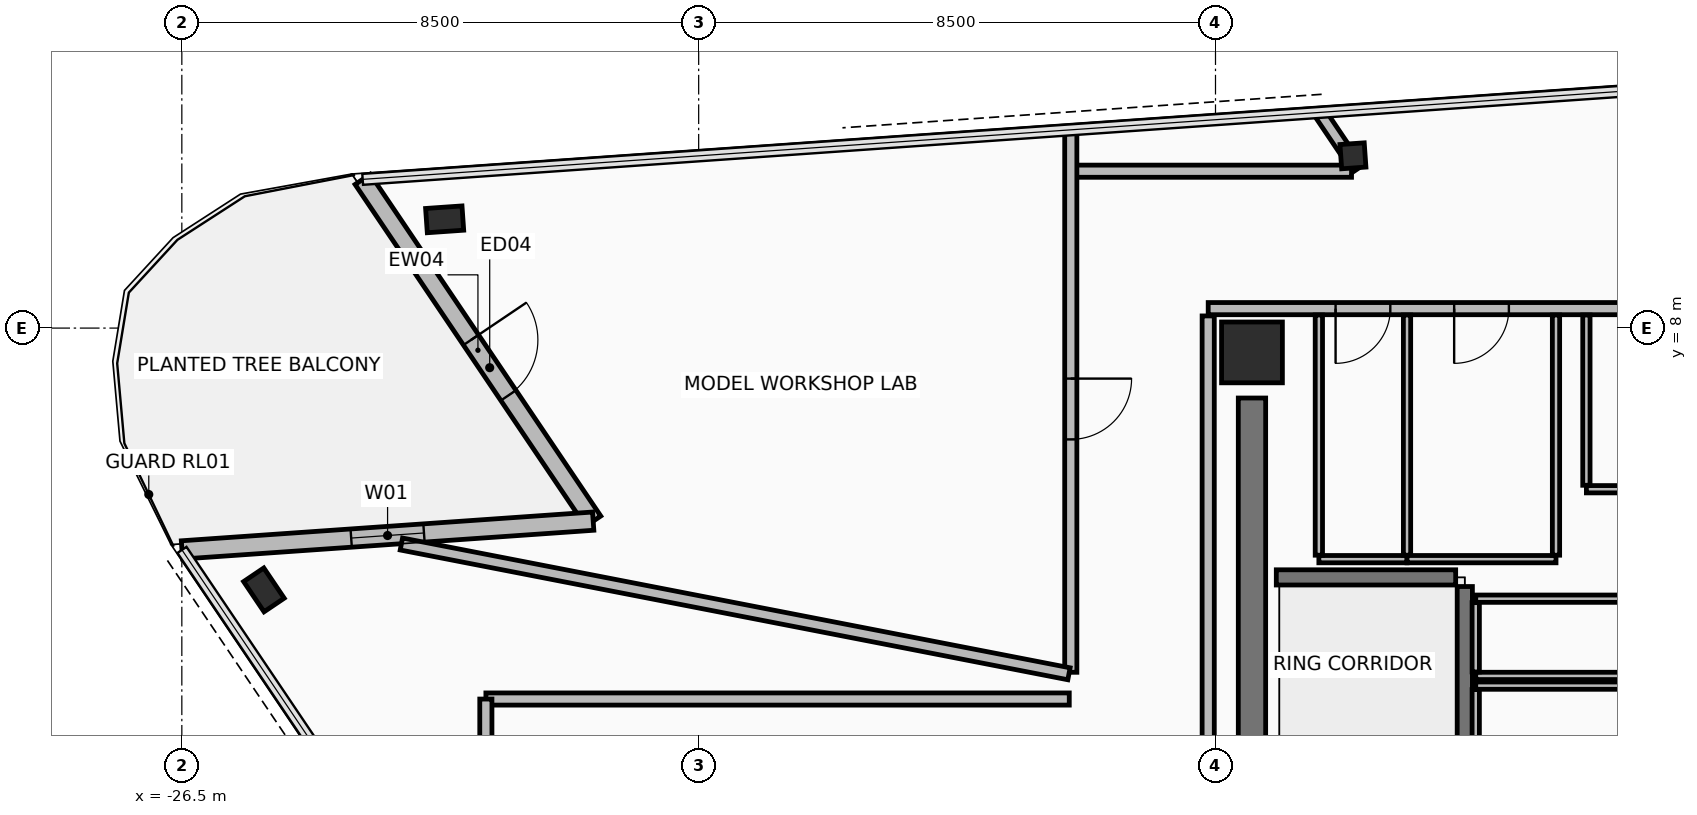
"""IFC4 building model, lengths in metres.
Left out: names, types, materials, properties, quantities, classifications, styles, units other than length and angle.
Written with IfcOpenShell. Run it as: python <this file> out.ifc"""

import sys

from ifc_helpers import new_model, si_unit, direction, frame, frame_2d, origin, origin_2d, place, context, subcontext, project, spatial, rectangle, hollow_rectangle, extrude, element, fill, save


model = new_model("IFC4")
c1 = context("Model", 3, precision=1e-05, world=origin(), true_north=direction((0.0, 1.0)))
c2 = subcontext(c1, "Body", "Model", "MODEL_VIEW")
j1 = project(units=[si_unit("LENGTHUNIT", "METRE"), si_unit("PLANEANGLEUNIT", "RADIAN")], contexts=[c1])
p1 = place(None, origin())
s1 = spatial("IfcSite", under=j1, at=p1, CompositionType="ELEMENT")
p2 = place(p1, origin())
s2 = spatial("IfcBuilding", under=s1, at=p2, CompositionType="ELEMENT")
p3 = place(p2, frame((0.0, 0.0, 264.2)))
s3 = spatial("IfcBuildingStorey", under=s2, at=p3, CompositionType="ELEMENT", Elevation=264.2)
p4 = place(p3, frame((-8.9, 7.6, 0.0), z_axis=(0.0, 0.0, 1.0), x_axis=(1.0, 0.0, 0.0)))
e1 = element("IfcColumn", 1, at=p4, inside=s3, PredefinedType="COLUMN", context=c2, shape_type="SweptSolid", body=[
    extrude(rectangle(XDim=1.0, YDim=1.0, at=origin_2d()), origin(), (0.0, 0.0, 1.0), 3.6),
])
p5 = place(p3, frame((-25.15, 3.695, 0.0), z_axis=(0.0, 0.0, 1.0), x_axis=(-0.559192903471, 0.829037572555, 0.0)))
e2 = element("IfcColumn", 2, at=p5, inside=s3, PredefinedType="COLUMN", context=c2, shape_type="SweptSolid", body=[
    extrude(hollow_rectangle(XDim=0.4, YDim=0.6, WallThickness=0.03, at=origin_2d()), origin(), (0.0, 0.0, 1.0), 3.6),
])
p6 = place(p3, frame((-7.24, 10.833, 0.0), z_axis=(0.0, 0.0, 1.0), x_axis=(0.99756392851, 0.069758214822, 0.0)))
e3 = element("IfcColumn", 3, at=p6, inside=s3, PredefinedType="COLUMN", context=c2, shape_type="SweptSolid", body=[
    extrude(hollow_rectangle(XDim=0.4, YDim=0.4, WallThickness=0.025, at=origin_2d()), origin(), (0.0, 0.0, 1.0), 3.6),
])
p7 = place(p3, frame((-22.177, 9.789, 0.0), z_axis=(0.0, 0.0, 1.0), x_axis=(0.99756392851, 0.069758214822, 0.0)))
e4 = element("IfcColumn", 4, at=p7, inside=s3, PredefinedType="COLUMN", context=c2, shape_type="SweptSolid", body=[
    extrude(hollow_rectangle(XDim=0.4, YDim=0.6, WallThickness=0.03, at=origin_2d()), origin(), (0.0, 0.0, 1.0), 3.6),
])
p8 = place(p3, frame((-23.526, 10.446, 0.0), z_axis=(0.0, 0.0, 1.0), x_axis=(0.559187716425, -0.829041071238, 0.0)))
e5 = element("IfcWall", 5, at=p8, inside=s3, PredefinedType="STANDARD", context=c2, shape_type="SweptSolid", body=[
    extrude(rectangle(XDim=6.78, YDim=0.3, at=frame_2d((3.39, 0.0))), origin(), (0.0, 0.0, 1.0), 2.765),
])
p9 = place(p8, frame((3.186, 0.0, 0.0)))
e6 = element("IfcOpeningElement", 6, at=p9, cuts=e5, PredefinedType="OPENING", context=c2, shape_type="SweptSolid", body=[
    extrude(rectangle(XDim=1.1, YDim=2.2, at=frame_2d((0.55, 1.1))), frame((0.0, 0.16, 0.0), z_axis=(0.0, -1.0, 0.0), x_axis=(1.0, 0.0, 0.0)), (0.0, 0.0, 1.0), 0.32),
])
p10 = place(p3, frame((-19.735, 4.825, 0.0), z_axis=(0.0, 0.0, 1.0), x_axis=(-0.997564507468, -0.06974993506, 0.0)))
e7 = element("IfcWall", 7, at=p10, inside=s3, PredefinedType="STANDARD", context=c2, shape_type="SweptSolid", body=[
    extrude(rectangle(XDim=6.78, YDim=0.3, at=frame_2d((3.39, 0.0))), origin(), (0.0, 0.0, 1.0), 2.765),
])
p11 = place(p10, frame((2.79, 0.0, 0.485)))
e8 = element("IfcOpeningElement", 8, at=p11, cuts=e7, PredefinedType="OPENING", context=c2, shape_type="SweptSolid", body=[
    extrude(rectangle(XDim=1.2, YDim=2.1, at=frame_2d((0.6, 1.05))), frame((0.0, 0.16, 0.0), z_axis=(0.0, -1.0, 0.0), x_axis=(1.0, 0.0, 0.0)), (0.0, 0.0, 1.0), 0.32),
])
p12 = place(p3, frame((-8.9, -3.85, 0.0), z_axis=(0.0, 0.0, 1.0), x_axis=(0.0, 1.0, 0.0)))
e9 = element("IfcWall", 9, at=p12, inside=s3, PredefinedType="SHEAR", context=c2, shape_type="SweptSolid", body=[
    extrude(rectangle(XDim=10.7, YDim=0.45, at=frame_2d((5.35, 0.0))), origin(), (0.0, 0.0, 1.0), 3.42),
])
p13 = place(p3, frame((9.62, 8.32, 0.0), z_axis=(0.0, 0.0, 1.0), x_axis=(-1.0, 0.0, 0.0)))
e10 = element("IfcWall", 10, at=p13, inside=s3, PredefinedType="PARTITIONING", context=c2, shape_type="SweptSolid", body=[
    extrude(rectangle(XDim=19.24, YDim=0.2, at=frame_2d((9.62, 0.0))), origin(), (0.0, 0.0, 1.0), 2.915),
])
p14 = place(p13, frame((10.97, 0.0, 0.0)))
e11 = element("IfcOpeningElement", 11, at=p14, cuts=e10, PredefinedType="OPENING", context=c2, shape_type="SweptSolid", body=[
    extrude(rectangle(XDim=0.9, YDim=2.1, at=frame_2d((0.45, 1.05))), frame((0.0, 0.11, 0.0), z_axis=(0.0, -1.0, 0.0), x_axis=(1.0, 0.0, 0.0)), (0.0, 0.0, 1.0), 0.22),
])
p15 = place(p13, frame((7.57, 0.0, 0.0)))
e12 = element("IfcOpeningElement", 12, at=p15, cuts=e10, PredefinedType="OPENING", context=c2, shape_type="SweptSolid", body=[
    extrude(rectangle(XDim=0.9, YDim=2.1, at=frame_2d((0.45, 1.05))), frame((0.0, 0.11, 0.0), z_axis=(0.0, -1.0, 0.0), x_axis=(1.0, 0.0, 0.0)), (0.0, 0.0, 1.0), 0.22),
])
p16 = place(p13, frame((16.245, 0.0, 0.0)))
e13 = element("IfcOpeningElement", 13, at=p16, cuts=e10, PredefinedType="OPENING", context=c2, shape_type="SweptSolid", body=[
    extrude(rectangle(XDim=0.9, YDim=2.1, at=frame_2d((0.45, 1.05))), frame((0.0, 0.11, 0.0), z_axis=(0.0, -1.0, 0.0), x_axis=(1.0, 0.0, 0.0)), (0.0, 0.0, 1.0), 0.22),
])
p17 = place(p13, frame((14.295, 0.0, 0.0)))
e14 = element("IfcOpeningElement", 14, at=p17, cuts=e10, PredefinedType="OPENING", context=c2, shape_type="SweptSolid", body=[
    extrude(rectangle(XDim=0.9, YDim=2.1, at=frame_2d((0.45, 1.05))), frame((0.0, 0.11, 0.0), z_axis=(0.0, -1.0, 0.0), x_axis=(1.0, 0.0, 0.0)), (0.0, 0.0, 1.0), 0.22),
])
p18 = place(p3, frame((-9.62, 8.2, 0.0), z_axis=(0.0, 0.0, 1.0), x_axis=(0.0, -1.0, 0.0)))
e15 = element("IfcWall", 15, at=p18, inside=s3, PredefinedType="PARTITIONING", context=c2, shape_type="SweptSolid", body=[
    extrude(rectangle(XDim=16.4, YDim=0.2, at=frame_2d((8.2, 0.0))), origin(), (0.0, 0.0, 1.0), 2.765),
])
p19 = place(p18, frame((12.65, 0.0, 0.0)))
e16 = element("IfcOpeningElement", 16, at=p19, cuts=e15, PredefinedType="OPENING", context=c2, shape_type="SweptSolid", body=[
    extrude(rectangle(XDim=1.1, YDim=2.15, at=frame_2d((0.55, 1.075))), frame((0.0, 0.11, 0.0), z_axis=(0.0, -1.0, 0.0), x_axis=(1.0, 0.0, 0.0)), (0.0, 0.0, 1.0), 0.22),
])
p20 = place(p3, frame((-5.4, -3.55, 0.0), z_axis=(0.0, 0.0, 1.0), x_axis=(0.0, 1.0, 0.0)))
e17 = element("IfcWall", 17, at=p20, inside=s3, PredefinedType="SHEAR", context=c2, shape_type="SweptSolid", body=[
    extrude(rectangle(XDim=7.3, YDim=0.25, at=frame_2d((3.65, 0.0))), origin(), (0.0, 0.0, 1.0), 3.42),
])
p21 = place(p3, frame((-8.5, 3.9, 0.0), z_axis=(0.0, 0.0, 1.0), x_axis=(1.0, 0.0, 0.0)))
e18 = element("IfcWall", 18, at=p21, inside=s3, PredefinedType="SHEAR", context=c2, shape_type="SweptSolid", body=[
    extrude(rectangle(XDim=2.95, YDim=0.25, at=frame_2d((1.475, 0.0))), origin(), (0.0, 0.0, 1.0), 3.42),
])
p22 = place(p3, frame((-5.22, 2.28, 0.0), z_axis=(0.0, 0.0, 1.0), x_axis=(1.0, 0.0, 0.0)))
e19 = element("IfcWall", 19, at=p22, inside=s3, PredefinedType="PARTITIONING", context=c2, shape_type="SweptSolid", body=[
    extrude(rectangle(XDim=3.47, YDim=0.12, at=frame_2d((1.735, 0.0))), origin(), (0.0, 0.0, 1.0), 3.42),
])
p23 = place(p3, frame((-1.815, 3.55, 0.0), z_axis=(0.0, 0.0, 1.0), x_axis=(-1.0, 0.0, 0.0)))
e20 = element("IfcWall", 20, at=p23, inside=s3, PredefinedType="PARTITIONING", context=c2, shape_type="SweptSolid", body=[
    extrude(rectangle(XDim=3.405, YDim=0.12, at=frame_2d((1.703, 0.0))), origin(), (0.0, 0.0, 1.0), 3.42),
])
p24 = place(p3, frame((-5.22, 3.485, 0.0), z_axis=(0.0, 0.0, 1.0), x_axis=(0.0, -1.0, 0.0)))
e21 = element("IfcWall", 21, at=p24, inside=s3, PredefinedType="PARTITIONING", context=c2, shape_type="SweptSolid", body=[
    extrude(rectangle(XDim=1.14, YDim=0.12, at=frame_2d((0.57, 0.0))), origin(), (0.0, 0.0, 1.0), 3.42),
])
p25 = place(p3, frame((-1.815, 2.12, 0.0), z_axis=(0.0, 0.0, 1.0), x_axis=(-1.0, 0.0, 0.0)))
e22 = element("IfcWall", 22, at=p25, inside=s3, PredefinedType="PARTITIONING", context=c2, shape_type="SweptSolid", body=[
    extrude(rectangle(XDim=3.405, YDim=0.12, at=frame_2d((1.703, 0.0))), origin(), (0.0, 0.0, 1.0), 3.42),
])
p26 = place(p3, frame((-5.22, 2.055, 0.0), z_axis=(0.0, 0.0, 1.0), x_axis=(0.0, -1.0, 0.0)))
e23 = element("IfcWall", 23, at=p26, inside=s3, PredefinedType="PARTITIONING", context=c2, shape_type="SweptSolid", body=[
    extrude(rectangle(XDim=1.11, YDim=0.12, at=frame_2d((0.555, 0.0))), origin(), (0.0, 0.0, 1.0), 3.42),
])
p27 = place(p3, frame((-3.4, 5.35, 0.0), z_axis=(0.0, 0.0, 1.0), x_axis=(1.0, 0.0, 0.0)))
e24 = element("IfcWall", 24, at=p27, inside=s3, PredefinedType="PARTITIONING", context=c2, shape_type="SweptSolid", body=[
    extrude(rectangle(XDim=3.2, YDim=0.12, at=frame_2d((1.6, 0.0))), origin(), (0.0, 0.0, 1.0), 3.42),
])
p28 = place(p3, frame((-3.4, 8.215, 0.0), z_axis=(0.0, 0.0, 1.0), x_axis=(0.0, -1.0, 0.0)))
e25 = element("IfcWall", 25, at=p28, inside=s3, PredefinedType="PARTITIONING", context=c2, shape_type="SweptSolid", body=[
    extrude(rectangle(XDim=2.8, YDim=0.12, at=frame_2d((1.4, 0.0))), origin(), (0.0, 0.0, 1.0), 2.715),
])
p29 = place(p3, frame((-7.8, 4.2, 0.0), z_axis=(0.0, 0.0, 1.0), x_axis=(1.0, 0.0, 0.0)))
e26 = element("IfcWall", 26, at=p29, inside=s3, PredefinedType="PARTITIONING", context=c2, shape_type="SweptSolid", body=[
    extrude(rectangle(XDim=1.45, YDim=0.12, at=frame_2d((0.725, 0.0))), origin(), (0.0, 0.0, 1.0), 3.42),
])
for number, where, z_axis, x_axis in (
    (27, (-6.35, 4.265, 0.0), (0.0, 0.0, 1.0), (0.0, 1.0, 0.0)),
    (28, (-7.8, 8.215, 0.0), (0.0, 0.0, 1.0), (0.0, -1.0, 0.0)),
):
    element("IfcWall", number, at=place(p3, frame(where, z_axis=z_axis, x_axis=x_axis)), inside=s3, PredefinedType="PARTITIONING", context=c2, shape_type="SweptSolid", body=[
        extrude(rectangle(XDim=3.95, YDim=0.12, at=frame_2d((1.975, 0.0))), origin(), (0.0, 0.0, 1.0), 2.715),
    ])
p30 = place(p3, frame((-6.35, 4.2, 0.0), z_axis=(0.0, 0.0, 1.0), x_axis=(1.0, 0.0, 0.0)))
e29 = element("IfcWall", 29, at=p30, inside=s3, PredefinedType="PARTITIONING", context=c2, shape_type="SweptSolid", body=[
    extrude(rectangle(XDim=2.45, YDim=0.12, at=frame_2d((1.225, 0.0))), origin(), (0.0, 0.0, 1.0), 3.42),
])
p31 = place(p3, frame((-3.9, 4.265, 0.0), z_axis=(0.0, 0.0, 1.0), x_axis=(0.0, 1.0, 0.0)))
e30 = element("IfcWall", 30, at=p31, inside=s3, PredefinedType="PARTITIONING", context=c2, shape_type="SweptSolid", body=[
    extrude(rectangle(XDim=3.95, YDim=0.12, at=frame_2d((1.975, 0.0))), origin(), (0.0, 0.0, 1.0), 2.715),
])
p32 = place(p3, frame((-7.78, 11.535, 0.0), z_axis=(0.0, 0.0, 1.0), x_axis=(0.559180531027, -0.82904591774, 0.0)))
e31 = element("IfcWall", 31, at=p32, inside=s3, PredefinedType="PARTITIONING", context=c2, shape_type="SweptSolid", body=[
    extrude(rectangle(XDim=1.104, YDim=0.2, at=frame_2d((0.552, 0.0))), origin(), (0.0, 0.0, 1.0), 2.765),
])
p33 = place(p3, frame((-7.263, 10.58, 0.0), z_axis=(0.0, 0.0, 1.0), x_axis=(-1.0, 0.0, 0.0)))
e32 = element("IfcWall", 32, at=p33, inside=s3, PredefinedType="PARTITIONING", context=c2, shape_type="SweptSolid", body=[
    extrude(rectangle(XDim=4.616, YDim=0.2, at=frame_2d((2.308, 0.0))), origin(), (0.0, 0.0, 1.0), 2.765),
])
p34 = place(p3, frame((-11.88, 11.26, 0.0), z_axis=(0.0, 0.0, 1.0), x_axis=(0.0, -1.0, 0.0)))
e33 = element("IfcWall", 33, at=p34, inside=s3, PredefinedType="PARTITIONING", context=c2, shape_type="SweptSolid", body=[
    extrude(rectangle(XDim=8.921, YDim=0.2, at=frame_2d((4.46, 0.0))), origin(), (0.0, 0.0, 1.0), 2.765),
])
p35 = place(p34, frame((4.091, 0.0, 0.0)))
e34 = element("IfcOpeningElement", 34, at=p35, cuts=e33, PredefinedType="OPENING", context=c2, shape_type="SweptSolid", body=[
    extrude(rectangle(XDim=1.0, YDim=2.15, at=frame_2d((0.5, 1.075))), frame((0.0, 0.11, 0.0), z_axis=(0.0, -1.0, 0.0), x_axis=(1.0, 0.0, 0.0)), (0.0, 0.0, 1.0), 0.22),
])
p36 = place(p3, frame((-11.91, 2.315, 0.0), z_axis=(0.0, 0.0, 1.0), x_axis=(-0.981625839426, 0.190815909638, 0.0)))
e35 = element("IfcWall", 35, at=p36, inside=s3, PredefinedType="PARTITIONING", context=c2, shape_type="SweptSolid", body=[
    extrude(rectangle(XDim=11.185, YDim=0.2, at=frame_2d((5.593, 0.0))), origin(), (0.0, 0.0, 1.0), 2.915),
])
p37 = place(p3, frame((-11.905, 1.9, 0.0), z_axis=(0.0, 0.0, 1.0), x_axis=(-1.0, 0.0, 0.0)))
e36 = element("IfcWall", 36, at=p37, inside=s3, PredefinedType="PARTITIONING", context=c2, shape_type="SweptSolid", body=[
    extrude(rectangle(XDim=9.594, YDim=0.2, at=frame_2d((4.797, 0.0))), origin(), (0.0, 0.0, 1.0), 3.115),
])
p38 = place(p3, frame((-21.5, 1.899, 0.0), z_axis=(0.0, 0.0, 1.0), x_axis=(0.0, -1.0, 0.0)))
e37 = element("IfcWall", 37, at=p38, inside=s3, PredefinedType="PARTITIONING", context=c2, shape_type="SweptSolid", body=[
    extrude(rectangle(XDim=3.799, YDim=0.2, at=frame_2d((1.899, 0.0))), origin(), (0.0, 0.0, 1.0), 2.765),
])
p39 = place(p9, origin())
e38 = element("IfcDoor", 38, at=p39, inside=s3, OperationType="SINGLE_SWING_LEFT", PredefinedType="DOOR", context=c2, shape_type="SweptSolid", body=[
    extrude(rectangle(XDim=1.1, YDim=2.2, at=frame_2d((0.55, 1.1))), frame((0.0, 0.025, 0.0), z_axis=(0.0, -1.0, 0.0), x_axis=(1.0, 0.0, 0.0)), (0.0, 0.0, 1.0), 0.05),
])
fill(e6, e38)
p40 = place(p11, origin())
e39 = element("IfcWindow", 39, at=p40, inside=s3, PartitioningType="SINGLE_PANEL", PredefinedType="WINDOW", context=c2, shape_type="SweptSolid", body=[
    extrude(rectangle(XDim=1.2, YDim=2.1, at=frame_2d((0.6, 1.05))), frame((0.0, 0.03, 0.0), z_axis=(0.0, -1.0, 0.0), x_axis=(1.0, 0.0, 0.0)), (0.0, 0.0, 1.0), 0.06),
])
fill(e8, e39)
p41 = place(p16, frame((0.9, 0.0, 0.0), z_axis=(0.0, 0.0, 1.0), x_axis=(-1.0, 0.0, 0.0)))
e40 = element("IfcDoor", 40, at=p41, inside=s3, OperationType="SINGLE_SWING_LEFT", PredefinedType="DOOR", context=c2, shape_type="SweptSolid", body=[
    extrude(rectangle(XDim=0.9, YDim=2.1, at=frame_2d((0.45, 1.05))), frame((0.0, 0.025, 0.0), z_axis=(0.0, -1.0, 0.0), x_axis=(1.0, 0.0, 0.0)), (0.0, 0.0, 1.0), 0.05),
])
fill(e13, e40)
p42 = place(p17, frame((0.9, 0.0, 0.0), z_axis=(0.0, 0.0, 1.0), x_axis=(-1.0, 0.0, 0.0)))
e41 = element("IfcDoor", 41, at=p42, inside=s3, OperationType="SINGLE_SWING_LEFT", PredefinedType="DOOR", context=c2, shape_type="SweptSolid", body=[
    extrude(rectangle(XDim=0.9, YDim=2.1, at=frame_2d((0.45, 1.05))), frame((0.0, 0.025, 0.0), z_axis=(0.0, -1.0, 0.0), x_axis=(1.0, 0.0, 0.0)), (0.0, 0.0, 1.0), 0.05),
])
fill(e14, e41)
p43 = place(p35, origin())
e42 = element("IfcDoor", 42, at=p43, inside=s3, OperationType="SINGLE_SWING_RIGHT", PredefinedType="DOOR", context=c2, shape_type="SweptSolid", body=[
    extrude(rectangle(XDim=1.0, YDim=2.15, at=frame_2d((0.5, 1.075))), frame((0.0, 0.025, 0.0), z_axis=(0.0, -1.0, 0.0), x_axis=(1.0, 0.0, 0.0)), (0.0, 0.0, 1.0), 0.05),
])
fill(e34, e42)
save(model, sys.argv[1])
